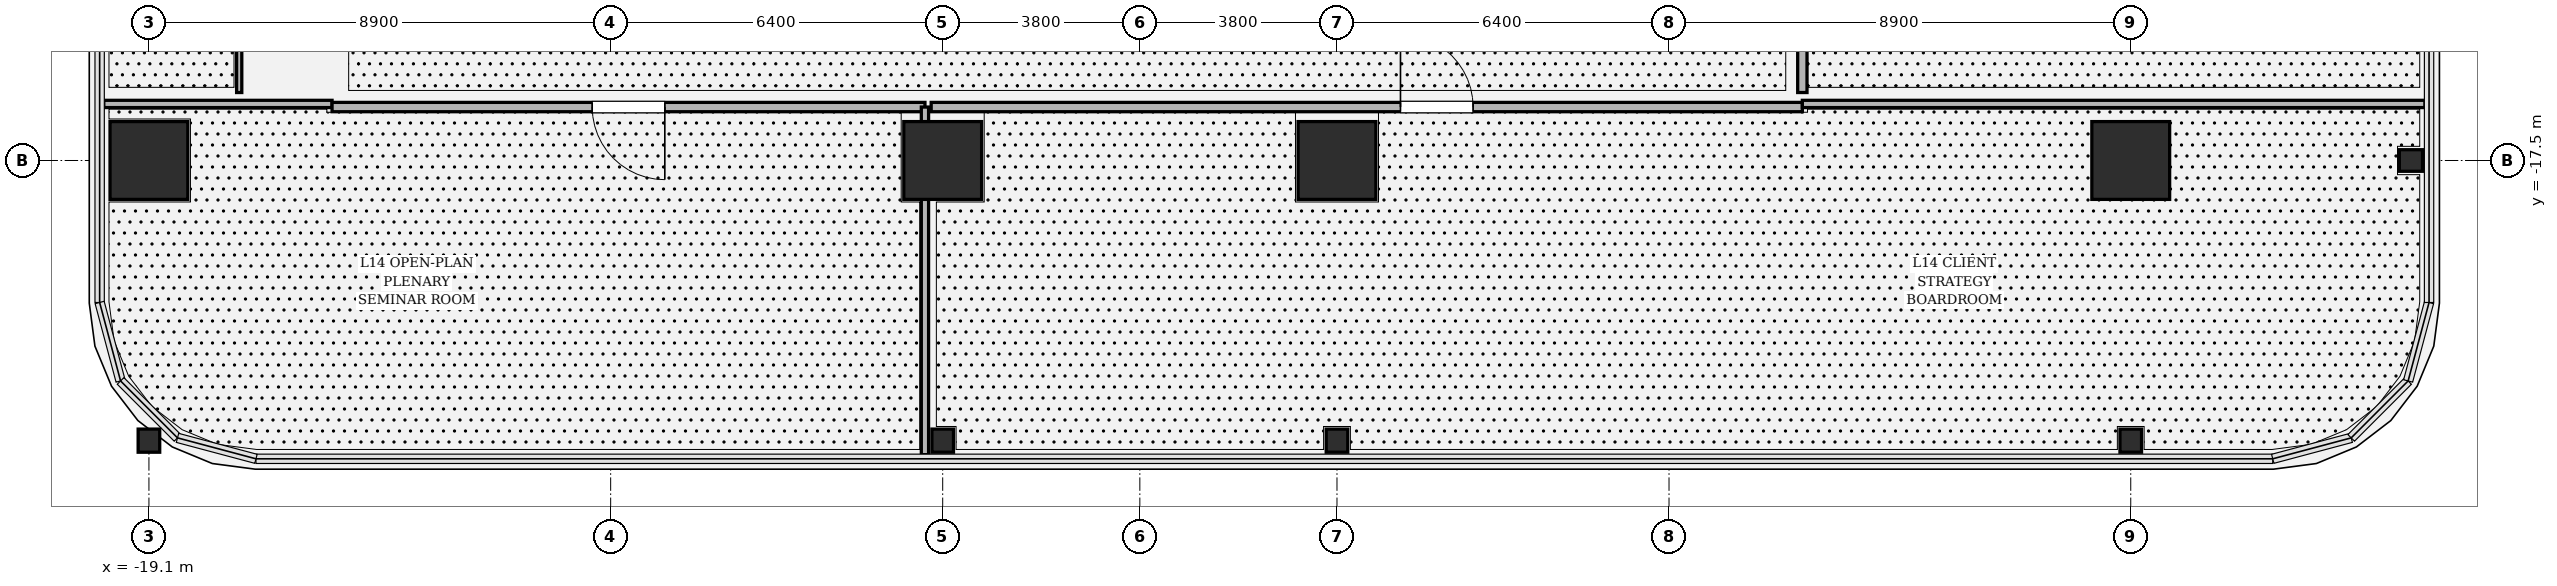
"""IFC4 building model, lengths in metres.
Left out: names, types, materials, properties, quantities, classifications, styles, units other than length and angle.
Written with IfcOpenShell. Run it as: python <this file> out.ifc"""

import sys

from ifc_helpers import new_model, si_unit, direction, frame, frame_2d, origin, origin_2d, place, context, subcontext, project, spatial, rectangle, hollow_rectangle, i_section, extrude, element, fill, save


model = new_model("IFC4")
c1 = context("Model", 3, precision=1e-05, world=origin(), true_north=direction((0.0, 1.0)))
c2 = subcontext(c1, "Body", "Model", "MODEL_VIEW")
j1 = project(units=[si_unit("LENGTHUNIT", "METRE"), si_unit("PLANEANGLEUNIT", "RADIAN")], contexts=[c1])
p1 = place(None, origin())
s1 = spatial("IfcSite", under=j1, at=p1, CompositionType="ELEMENT")
p2 = place(p1, origin())
s2 = spatial("IfcBuilding", under=s1, at=p2, CompositionType="ELEMENT")
p3 = place(p2, frame((0.0, 0.0, 64.65)))
s3 = spatial("IfcBuildingStorey", under=s2, at=p3, CompositionType="ELEMENT", Elevation=64.65)
for number, where, z_axis, x_axis in (
    (1, (-19.1, -17.5, 0.0), (0.0, 0.0, 1.0), (1.0, 0.0, 0.0)),
    (2, (-3.8, -17.5, 0.0), (0.0, 0.0, 1.0), (1.0, 0.0, 0.0)),
    (3, (3.8, -17.5, 0.0), (0.0, 0.0, 1.0), (1.0, 0.0, 0.0)),
    (4, (19.1, -17.5, 0.0), (0.0, 0.0, 1.0), (1.0, 0.0, 0.0)),
):
    element("IfcColumn", number, at=place(p3, frame(where, z_axis=z_axis, x_axis=x_axis)), inside=s3, PredefinedType="COLUMN", context=c2, shape_type="SweptSolid", body=[
        extrude(hollow_rectangle(XDim=1.5, YDim=1.5, WallThickness=0.045, at=origin_2d()), origin(), (0.0, 0.0, 1.0), 4.05),
    ])
for number, where, z_axis, x_axis in (
    (5, (-19.1, -22.9, 0.0), (0.0, 0.0, 1.0), (1.0, 0.0, 0.0)),
    (6, (-3.8, -22.9, 0.0), (0.0, 0.0, 1.0), (1.0, 0.0, 0.0)),
    (7, (3.8, -22.9, 0.0), (0.0, 0.0, 1.0), (1.0, 0.0, 0.0)),
    (8, (19.1, -22.9, 0.0), (0.0, 0.0, 1.0), (1.0, 0.0, 0.0)),
    (9, (24.5, -17.5, 0.0), (0.0, 0.0, 1.0), (0.0, 1.0, 0.0)),
):
    element("IfcColumn", number, at=place(p3, frame(where, z_axis=z_axis, x_axis=x_axis)), inside=s3, PredefinedType="COLUMN", context=c2, shape_type="SweptSolid", body=[
        extrude(i_section(OverallWidth=0.416, OverallDepth=0.446, WebThickness=0.039, FlangeThickness=0.062, FilletRadius=0.018, at=origin_2d()), origin(), (0.0, 0.0, 1.0), 4.048),
    ])
p4 = place(p3, frame((-19.97, -16.41, 0.0), z_axis=(0.0, 0.0, 1.0), x_axis=(1.0, 0.0, 0.0)))
e10 = element("IfcWall", 10, at=p4, inside=s3, PredefinedType="PARTITIONING", context=c2, shape_type="SweptSolid", body=[
    extrude(rectangle(XDim=4.4, YDim=0.14, at=frame_2d((2.2, 0.0))), origin(), (0.0, 0.0, 1.0), 3.104),
])
p5 = place(p3, frame((-15.57, -16.47, 0.0), z_axis=(0.0, 0.0, 1.0), x_axis=(1.0, 0.0, 0.0)))
e11 = element("IfcWall", 11, at=p5, inside=s3, PredefinedType="PARTITIONING", context=c2, shape_type="SweptSolid", body=[
    extrude(rectangle(XDim=11.428, YDim=0.18, at=frame_2d((5.714, 0.0))), origin(), (0.0, 0.0, 1.0), 3.104),
])
p6 = place(p5, frame((5.014, 0.0, 0.0)))
e12 = element("IfcOpeningElement", 12, at=p6, cuts=e11, PredefinedType="OPENING", context=c2, shape_type="SweptSolid", body=[
    extrude(rectangle(XDim=1.4, YDim=2.25, at=frame_2d((0.7, 1.125))), frame((0.0, 0.1, 0.0), z_axis=(0.0, -1.0, 0.0), x_axis=(1.0, 0.0, 0.0)), (0.0, 0.0, 1.0), 0.2),
])
p7 = place(p3, frame((-4.142, -16.47, 0.0), z_axis=(0.0, 0.0, 1.0), x_axis=(0.0, -1.0, 0.0)))
e13 = element("IfcWall", 13, at=p7, inside=s3, PredefinedType="PARTITIONING", context=c2, shape_type="SweptSolid", body=[
    extrude(rectangle(XDim=6.7, YDim=0.14, at=frame_2d((3.35, 0.0))), origin(), (0.0, 0.0, 1.0), 2.484),
])
p8 = place(p3, frame((-4.022, -16.47, 0.0), z_axis=(0.0, 0.0, 1.0), x_axis=(1.0, 0.0, 0.0)))
e14 = element("IfcWall", 14, at=p8, inside=s3, PredefinedType="PARTITIONING", context=c2, shape_type="SweptSolid", body=[
    extrude(rectangle(XDim=16.792, YDim=0.18, at=frame_2d((8.396, 0.0))), origin(), (0.0, 0.0, 1.0), 3.104),
])
p9 = place(p8, frame((9.046, 0.0, 0.0)))
e15 = element("IfcOpeningElement", 15, at=p9, cuts=e14, PredefinedType="OPENING", context=c2, shape_type="SweptSolid", body=[
    extrude(rectangle(XDim=1.4, YDim=2.25, at=frame_2d((0.7, 1.125))), frame((0.0, 0.1, 0.0), z_axis=(0.0, -1.0, 0.0), x_axis=(1.0, 0.0, 0.0)), (0.0, 0.0, 1.0), 0.2),
])
p10 = place(p3, frame((12.77, -16.41, 0.0), z_axis=(0.0, 0.0, 1.0), x_axis=(1.0, 0.0, 0.0)))
e16 = element("IfcWall", 16, at=p10, inside=s3, PredefinedType="PARTITIONING", context=c2, shape_type="SweptSolid", body=[
    extrude(rectangle(XDim=12.0, YDim=0.14, at=frame_2d((6.0, 0.0))), origin(), (0.0, 0.0, 1.0), 2.524),
])
p11 = place(p3, frame((12.77, -16.19, 0.0), z_axis=(0.0, 0.0, 1.0), x_axis=(0.0, 1.0, 0.0)))
e17 = element("IfcWall", 17, at=p11, inside=s3, PredefinedType="PARTITIONING", context=c2, shape_type="SweptSolid", body=[
    extrude(rectangle(XDim=2.01, YDim=0.18, at=frame_2d((1.005, 0.0))), origin(), (0.0, 0.0, 1.0), 3.81),
])
p12 = place(p3, frame((-17.36, -14.62, 0.0), z_axis=(0.0, 0.0, 1.0), x_axis=(0.0, -1.0, 0.0)))
e18 = element("IfcWall", 18, at=p12, inside=s3, PredefinedType="PARTITIONING", context=c2, shape_type="SweptSolid", body=[
    extrude(rectangle(XDim=1.57, YDim=0.1, at=frame_2d((0.785, 0.0))), origin(), (0.0, 0.0, 1.0), 3.81),
])
p13 = place(p6, origin())
e19 = element("IfcDoor", 19, at=p13, inside=s3, OperationType="SINGLE_SWING_RIGHT", PredefinedType="DOOR", context=c2, shape_type="SweptSolid", body=[
    extrude(rectangle(XDim=1.4, YDim=2.25, at=frame_2d((0.7, 1.125))), frame((0.0, 0.025, 0.0), z_axis=(0.0, -1.0, 0.0), x_axis=(1.0, 0.0, 0.0)), (0.0, 0.0, 1.0), 0.05),
])
fill(e12, e19)
p14 = place(p9, origin())
e20 = element("IfcDoor", 20, at=p14, inside=s3, OperationType="SINGLE_SWING_LEFT", PredefinedType="DOOR", context=c2, shape_type="SweptSolid", body=[
    extrude(rectangle(XDim=1.4, YDim=2.25, at=frame_2d((0.7, 1.125))), frame((0.0, 0.025, 0.0), z_axis=(0.0, -1.0, 0.0), x_axis=(1.0, 0.0, 0.0)), (0.0, 0.0, 1.0), 0.05),
])
fill(e15, e20)
save(model, sys.argv[1])
